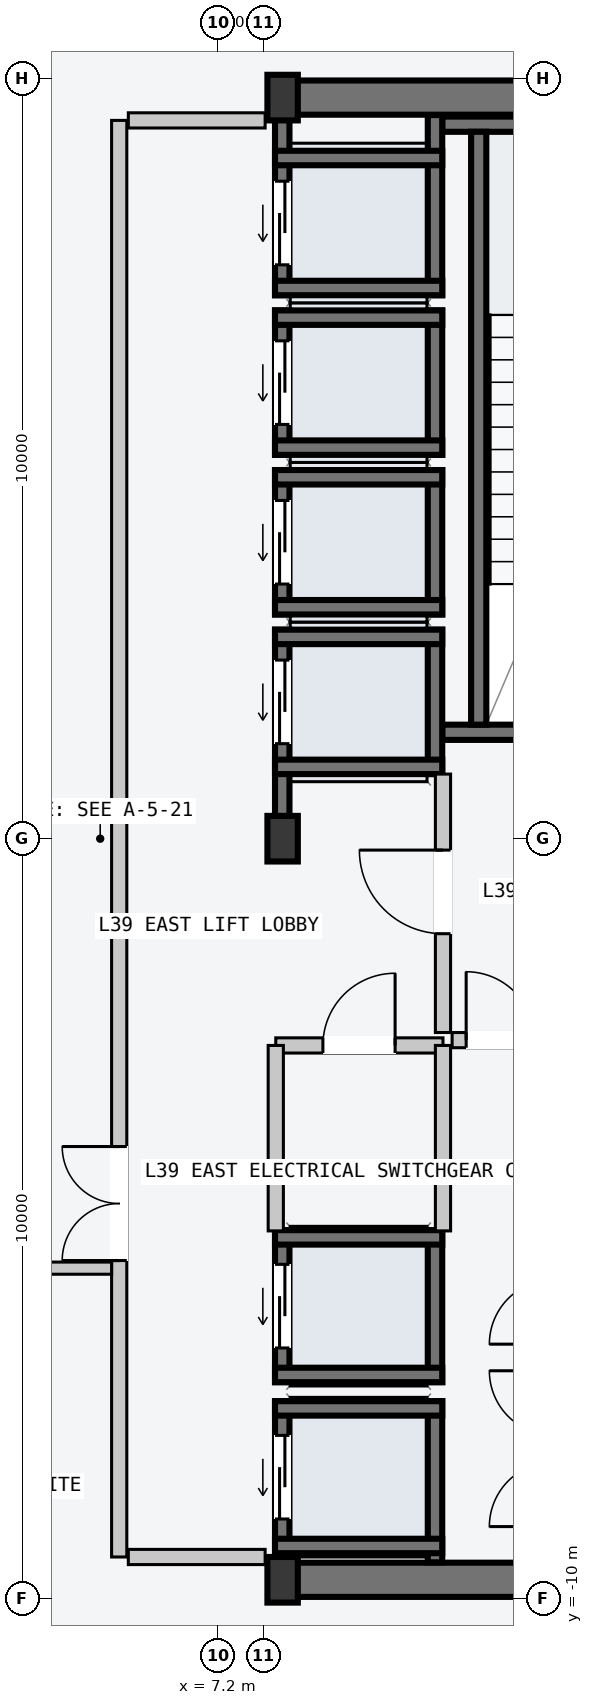
"""IFC4 building model, lengths in metres.
Left out: names, types, materials, properties, quantities, classifications, styles, units other than length and angle.
Written with IfcOpenShell. Run it as: python <this file> out.ifc"""

import sys

from ifc_helpers import new_model, si_unit, direction, frame, frame_2d, origin, origin_2d, place, context, subcontext, project, spatial, rectangle, i_section, extrude, element, fill, save


model = new_model("IFC4")
c1 = context("Model", 3, precision=1e-05, world=origin(), true_north=direction((0.0, 1.0)))
c2 = subcontext(c1, "Body", "Model", "MODEL_VIEW")
j1 = project(units=[si_unit("LENGTHUNIT", "METRE"), si_unit("PLANEANGLEUNIT", "RADIAN")], contexts=[c1])
p1 = place(None, origin())
s1 = spatial("IfcSite", under=j1, at=p1, CompositionType="ELEMENT")
p2 = place(p1, origin())
s2 = spatial("IfcBuilding", under=s1, at=p2, CompositionType="ELEMENT")
p3 = place(p2, frame((0.0, 0.0, 150.6)))
s3 = spatial("IfcBuildingStorey", under=s2, at=p3, CompositionType="ELEMENT", Elevation=150.6)
for number, where, z_axis, x_axis in (
    (1, (8.07, -9.75, -0.2), (0.0, 0.0, 1.0), (1.0, 0.0, 0.0)),
    (2, (8.07, 9.75, -0.2), (0.0, 0.0, 1.0), (1.0, 0.0, 0.0)),
):
    element("IfcWall", number, at=place(p3, frame(where, z_axis=z_axis, x_axis=x_axis)), inside=s3, PredefinedType="SHEAR", context=c2, shape_type="SweptSolid", body=[
        extrude(rectangle(XDim=6.46, YDim=0.45, at=frame_2d((3.23, 0.0))), origin(), (0.0, 0.0, 1.0), 4.5),
    ])
p4 = place(p3, frame((10.15, 1.4, -0.2), z_axis=(0.0, 0.0, 1.0), x_axis=(1.0, 0.0, 0.0)))
e3 = element("IfcWall", 3, at=p4, inside=s3, PredefinedType="SOLIDWALL", context=c2, shape_type="SweptSolid", body=[
    extrude(rectangle(XDim=4.1, YDim=0.2, at=frame_2d((2.05, 0.0))), origin(), (0.0, 0.0, 1.0), 4.5),
])
p5 = place(p4, frame((1.5, 0.0, 0.2)))
e4 = element("IfcOpeningElement", 4, at=p5, cuts=e3, PredefinedType="OPENING", context=c2, shape_type="SweptSolid", body=[
    extrude(rectangle(XDim=1.12, YDim=2.18, at=frame_2d((0.56, 1.09))), frame((0.0, 0.11, 0.0), z_axis=(0.0, -1.0, 0.0), x_axis=(1.0, 0.0, 0.0)), (0.0, 0.0, 1.0), 0.22),
])
p6 = place(p3, frame((10.15, 9.4, -0.2), z_axis=(0.0, 0.0, 1.0), x_axis=(1.0, 0.0, 0.0)))
e5 = element("IfcWall", 5, at=p6, inside=s3, PredefinedType="SOLIDWALL", context=c2, shape_type="SweptSolid", body=[
    extrude(rectangle(XDim=4.1, YDim=0.2, at=frame_2d((2.05, 0.0))), origin(), (0.0, 0.0, 1.0), 4.5),
])
p7 = place(p3, frame((10.63, 1.5, -0.2), z_axis=(0.0, 0.0, 1.0), x_axis=(0.0, 1.0, 0.0)))
e6 = element("IfcWall", 6, at=p7, inside=s3, PredefinedType="SOLIDWALL", context=c2, shape_type="SweptSolid", body=[
    extrude(rectangle(XDim=7.8, YDim=0.2, at=frame_2d((3.9, 0.0))), origin(), (0.0, 0.0, 1.0), 4.5),
])
for number, where, z_axis, x_axis in (
    (7, (8.05, -9.75, 0.0), (0.0, 0.0, 1.0), (1.0, 0.0, 0.0)),
    (8, (8.05, 0.0, 0.0), (0.0, 0.0, 1.0), (1.0, 0.0, 0.0)),
    (9, (8.05, 9.75, 0.0), (0.0, 0.0, 1.0), (1.0, 0.0, 0.0)),
):
    element("IfcColumn", number, at=place(p3, frame(where, z_axis=z_axis, x_axis=x_axis)), inside=s3, PredefinedType="COLUMN", context=c2, shape_type="SweptSolid", body=[
        extrude(i_section(OverallWidth=0.4, OverallDepth=0.6, WebThickness=0.022, FlangeThickness=0.036, at=origin_2d()), origin(), (0.0, 0.0, 1.0), 4.5),
    ])
p8 = place(p3, frame((8.045, 0.21, -0.2), z_axis=(0.0, 0.0, 1.0), x_axis=(0.0, 1.0, 0.0)))
e10 = element("IfcWall", 10, at=p8, inside=s3, PredefinedType="SOLIDWALL", context=c2, shape_type="SweptSolid", body=[
    extrude(rectangle(XDim=2.54, YDim=0.19, at=frame_2d((1.27, 0.0))), origin(), (0.0, 0.0, 1.0), 4.5),
])
p9 = place(p8, frame((1.04, 0.0, 0.2)))
e11 = element("IfcOpeningElement", 11, at=p9, cuts=e10, PredefinedType="OPENING", context=c2, shape_type="SweptSolid", body=[
    extrude(rectangle(XDim=1.1, YDim=2.2, at=frame_2d((0.55, 1.1))), frame((0.0, 0.105, 0.0), z_axis=(0.0, -1.0, 0.0), x_axis=(1.0, 0.0, 0.0)), (0.0, 0.0, 1.0), 0.21),
])
p10 = place(p3, frame((10.055, 0.85, -0.2), z_axis=(0.0, 0.0, 1.0), x_axis=(0.0, 1.0, 0.0)))
e12 = element("IfcWall", 12, at=p10, inside=s3, PredefinedType="SOLIDWALL", context=c2, shape_type="SweptSolid", body=[
    extrude(rectangle(XDim=1.9, YDim=0.19, at=frame_2d((0.95, 0.0))), origin(), (0.0, 0.0, 1.0), 4.5),
])
for number, where, z_axis, x_axis in (
    (13, (7.95, 2.655, -0.2), (0.0, 0.0, 1.0), (1.0, 0.0, 0.0)),
    (14, (7.95, 0.945, -0.2), (0.0, 0.0, 1.0), (1.0, 0.0, 0.0)),
):
    element("IfcWall", number, at=place(p3, frame(where, z_axis=z_axis, x_axis=x_axis)), inside=s3, PredefinedType="SOLIDWALL", context=c2, shape_type="SweptSolid", body=[
        extrude(rectangle(XDim=2.2, YDim=0.19, at=frame_2d((1.1, 0.0))), origin(), (0.0, 0.0, 1.0), 4.5),
    ])
p11 = place(p3, frame((8.045, 2.95, -0.2), z_axis=(0.0, 0.0, 1.0), x_axis=(0.0, 1.0, 0.0)))
e15 = element("IfcWall", 15, at=p11, inside=s3, PredefinedType="SOLIDWALL", context=c2, shape_type="SweptSolid", body=[
    extrude(rectangle(XDim=1.9, YDim=0.19, at=frame_2d((0.95, 0.0))), origin(), (0.0, 0.0, 1.0), 4.5),
])
p12 = place(p11, frame((0.4, 0.0, 0.2)))
e16 = element("IfcOpeningElement", 16, at=p12, cuts=e15, PredefinedType="OPENING", context=c2, shape_type="SweptSolid", body=[
    extrude(rectangle(XDim=1.1, YDim=2.2, at=frame_2d((0.55, 1.1))), frame((0.0, 0.105, 0.0), z_axis=(0.0, -1.0, 0.0), x_axis=(1.0, 0.0, 0.0)), (0.0, 0.0, 1.0), 0.21),
])
p13 = place(p3, frame((10.055, 2.95, -0.2), z_axis=(0.0, 0.0, 1.0), x_axis=(0.0, 1.0, 0.0)))
e17 = element("IfcWall", 17, at=p13, inside=s3, PredefinedType="SOLIDWALL", context=c2, shape_type="SweptSolid", body=[
    extrude(rectangle(XDim=1.9, YDim=0.19, at=frame_2d((0.95, 0.0))), origin(), (0.0, 0.0, 1.0), 4.5),
])
for number, where, z_axis, x_axis in (
    (18, (7.95, 4.755, -0.2), (0.0, 0.0, 1.0), (1.0, 0.0, 0.0)),
    (19, (7.95, 3.045, -0.2), (0.0, 0.0, 1.0), (1.0, 0.0, 0.0)),
):
    element("IfcWall", number, at=place(p3, frame(where, z_axis=z_axis, x_axis=x_axis)), inside=s3, PredefinedType="SOLIDWALL", context=c2, shape_type="SweptSolid", body=[
        extrude(rectangle(XDim=2.2, YDim=0.19, at=frame_2d((1.1, 0.0))), origin(), (0.0, 0.0, 1.0), 4.5),
    ])
p14 = place(p3, frame((8.045, 5.05, -0.2), z_axis=(0.0, 0.0, 1.0), x_axis=(0.0, 1.0, 0.0)))
e20 = element("IfcWall", 20, at=p14, inside=s3, PredefinedType="SOLIDWALL", context=c2, shape_type="SweptSolid", body=[
    extrude(rectangle(XDim=1.9, YDim=0.19, at=frame_2d((0.95, 0.0))), origin(), (0.0, 0.0, 1.0), 4.5),
])
p15 = place(p14, frame((0.4, 0.0, 0.2)))
e21 = element("IfcOpeningElement", 21, at=p15, cuts=e20, PredefinedType="OPENING", context=c2, shape_type="SweptSolid", body=[
    extrude(rectangle(XDim=1.1, YDim=2.2, at=frame_2d((0.55, 1.1))), frame((0.0, 0.105, 0.0), z_axis=(0.0, -1.0, 0.0), x_axis=(1.0, 0.0, 0.0)), (0.0, 0.0, 1.0), 0.21),
])
p16 = place(p3, frame((10.055, 5.05, -0.2), z_axis=(0.0, 0.0, 1.0), x_axis=(0.0, 1.0, 0.0)))
e22 = element("IfcWall", 22, at=p16, inside=s3, PredefinedType="SOLIDWALL", context=c2, shape_type="SweptSolid", body=[
    extrude(rectangle(XDim=1.9, YDim=0.19, at=frame_2d((0.95, 0.0))), origin(), (0.0, 0.0, 1.0), 4.5),
])
for number, where, z_axis, x_axis in (
    (23, (7.95, 6.855, -0.2), (0.0, 0.0, 1.0), (1.0, 0.0, 0.0)),
    (24, (7.95, 5.145, -0.2), (0.0, 0.0, 1.0), (1.0, 0.0, 0.0)),
):
    element("IfcWall", number, at=place(p3, frame(where, z_axis=z_axis, x_axis=x_axis)), inside=s3, PredefinedType="SOLIDWALL", context=c2, shape_type="SweptSolid", body=[
        extrude(rectangle(XDim=2.2, YDim=0.19, at=frame_2d((1.1, 0.0))), origin(), (0.0, 0.0, 1.0), 4.5),
    ])
p17 = place(p3, frame((8.045, 7.15, -0.2), z_axis=(0.0, 0.0, 1.0), x_axis=(0.0, 1.0, 0.0)))
e25 = element("IfcWall", 25, at=p17, inside=s3, PredefinedType="SOLIDWALL", context=c2, shape_type="SweptSolid", body=[
    extrude(rectangle(XDim=2.37, YDim=0.19, at=frame_2d((1.185, 0.0))), origin(), (0.0, 0.0, 1.0), 4.5),
])
p18 = place(p17, frame((0.4, 0.0, 0.2)))
e26 = element("IfcOpeningElement", 26, at=p18, cuts=e25, PredefinedType="OPENING", context=c2, shape_type="SweptSolid", body=[
    extrude(rectangle(XDim=1.1, YDim=2.2, at=frame_2d((0.55, 1.1))), frame((0.0, 0.105, 0.0), z_axis=(0.0, -1.0, 0.0), x_axis=(1.0, 0.0, 0.0)), (0.0, 0.0, 1.0), 0.21),
])
p19 = place(p3, frame((10.055, 7.15, -0.2), z_axis=(0.0, 0.0, 1.0), x_axis=(0.0, 1.0, 0.0)))
e27 = element("IfcWall", 27, at=p19, inside=s3, PredefinedType="SOLIDWALL", context=c2, shape_type="SweptSolid", body=[
    extrude(rectangle(XDim=2.37, YDim=0.19, at=frame_2d((1.185, 0.0))), origin(), (0.0, 0.0, 1.0), 4.5),
])
for number, where, z_axis, x_axis in (
    (28, (7.95, 8.955, -0.2), (0.0, 0.0, 1.0), (1.0, 0.0, 0.0)),
    (29, (7.95, 7.245, -0.2), (0.0, 0.0, 1.0), (1.0, 0.0, 0.0)),
):
    element("IfcWall", number, at=place(p3, frame(where, z_axis=z_axis, x_axis=x_axis)), inside=s3, PredefinedType="SOLIDWALL", context=c2, shape_type="SweptSolid", body=[
        extrude(rectangle(XDim=2.2, YDim=0.19, at=frame_2d((1.1, 0.0))), origin(), (0.0, 0.0, 1.0), 4.5),
    ])
p20 = place(p3, frame((8.045, -9.52, -0.2), z_axis=(0.0, 0.0, 1.0), x_axis=(0.0, 1.0, 0.0)))
e30 = element("IfcWall", 30, at=p20, inside=s3, PredefinedType="SOLIDWALL", context=c2, shape_type="SweptSolid", body=[
    extrude(rectangle(XDim=2.12, YDim=0.19, at=frame_2d((1.06, 0.0))), origin(), (0.0, 0.0, 1.0), 4.5),
])
p21 = place(p20, frame((0.57, 0.0, 0.2)))
e31 = element("IfcOpeningElement", 31, at=p21, cuts=e30, PredefinedType="OPENING", context=c2, shape_type="SweptSolid", body=[
    extrude(rectangle(XDim=1.1, YDim=2.2, at=frame_2d((0.55, 1.1))), frame((0.0, 0.105, 0.0), z_axis=(0.0, -1.0, 0.0), x_axis=(1.0, 0.0, 0.0)), (0.0, 0.0, 1.0), 0.21),
])
p22 = place(p3, frame((10.055, -9.52, -0.2), z_axis=(0.0, 0.0, 1.0), x_axis=(0.0, 1.0, 0.0)))
e32 = element("IfcWall", 32, at=p22, inside=s3, PredefinedType="SOLIDWALL", context=c2, shape_type="SweptSolid", body=[
    extrude(rectangle(XDim=2.12, YDim=0.19, at=frame_2d((1.06, 0.0))), origin(), (0.0, 0.0, 1.0), 4.5),
])
for number, where, z_axis, x_axis in (
    (33, (7.95, -7.495, -0.2), (0.0, 0.0, 1.0), (1.0, 0.0, 0.0)),
    (34, (7.95, -9.305, -0.2), (0.0, 0.0, 1.0), (1.0, 0.0, 0.0)),
):
    element("IfcWall", number, at=place(p3, frame(where, z_axis=z_axis, x_axis=x_axis)), inside=s3, PredefinedType="SOLIDWALL", context=c2, shape_type="SweptSolid", body=[
        extrude(rectangle(XDim=2.2, YDim=0.19, at=frame_2d((1.1, 0.0))), origin(), (0.0, 0.0, 1.0), 4.5),
    ])
p23 = place(p3, frame((8.045, -7.15, -0.2), z_axis=(0.0, 0.0, 1.0), x_axis=(0.0, 1.0, 0.0)))
e35 = element("IfcWall", 35, at=p23, inside=s3, PredefinedType="SOLIDWALL", context=c2, shape_type="SweptSolid", body=[
    extrude(rectangle(XDim=2.0, YDim=0.19, at=frame_2d((1.0, 0.0))), origin(), (0.0, 0.0, 1.0), 4.5),
])
p24 = place(p23, frame((0.45, 0.0, 0.2)))
e36 = element("IfcOpeningElement", 36, at=p24, cuts=e35, PredefinedType="OPENING", context=c2, shape_type="SweptSolid", body=[
    extrude(rectangle(XDim=1.1, YDim=2.2, at=frame_2d((0.55, 1.1))), frame((0.0, 0.105, 0.0), z_axis=(0.0, -1.0, 0.0), x_axis=(1.0, 0.0, 0.0)), (0.0, 0.0, 1.0), 0.21),
])
p25 = place(p3, frame((10.055, -7.15, -0.2), z_axis=(0.0, 0.0, 1.0), x_axis=(0.0, 1.0, 0.0)))
e37 = element("IfcWall", 37, at=p25, inside=s3, PredefinedType="SOLIDWALL", context=c2, shape_type="SweptSolid", body=[
    extrude(rectangle(XDim=2.0, YDim=0.19, at=frame_2d((1.0, 0.0))), origin(), (0.0, 0.0, 1.0), 4.5),
])
for number, where, z_axis, x_axis in (
    (38, (7.95, -5.245, -0.2), (0.0, 0.0, 1.0), (1.0, 0.0, 0.0)),
    (39, (7.95, -7.055, -0.2), (0.0, 0.0, 1.0), (1.0, 0.0, 0.0)),
):
    element("IfcWall", number, at=place(p3, frame(where, z_axis=z_axis, x_axis=x_axis)), inside=s3, PredefinedType="SOLIDWALL", context=c2, shape_type="SweptSolid", body=[
        extrude(rectangle(XDim=2.2, YDim=0.19, at=frame_2d((1.1, 0.0))), origin(), (0.0, 0.0, 1.0), 4.5),
    ])
p26 = place(p3, frame((5.9, -9.45, 0.0), z_axis=(0.0, 0.0, 1.0), x_axis=(0.0, 1.0, 0.0)))
e40 = element("IfcWall", 40, at=p26, inside=s3, PredefinedType="PARTITIONING", context=c2, shape_type="SweptSolid", body=[
    extrude(rectangle(XDim=18.9, YDim=0.2, at=frame_2d((9.45, 0.0))), origin(), (0.0, 0.0, 1.0), 4.3),
])
p27 = place(p26, frame((3.9, 0.0, 0.0)))
e41 = element("IfcOpeningElement", 41, at=p27, cuts=e40, PredefinedType="OPENING", context=c2, shape_type="SweptSolid", body=[
    extrude(rectangle(XDim=1.5, YDim=2.2, at=frame_2d((0.75, 1.1))), frame((0.0, 0.11, 0.0), z_axis=(0.0, -1.0, 0.0), x_axis=(1.0, 0.0, 0.0)), (0.0, 0.0, 1.0), 0.22),
])
for number, where, z_axis, x_axis in (
    (42, (6.02, -9.45, 0.0), (0.0, 0.0, 1.0), (1.0, 0.0, 0.0)),
    (43, (6.02, 9.45, 0.0), (0.0, 0.0, 1.0), (1.0, 0.0, 0.0)),
):
    element("IfcWall", number, at=place(p3, frame(where, z_axis=z_axis, x_axis=x_axis)), inside=s3, PredefinedType="PARTITIONING", context=c2, shape_type="SweptSolid", body=[
        extrude(rectangle(XDim=1.8, YDim=0.2, at=frame_2d((0.9, 0.0))), origin(), (0.0, 0.0, 1.0), 4.3),
    ])
p28 = place(p3, frame((10.16, -2.55, 0.0), z_axis=(0.0, 0.0, 1.0), x_axis=(0.0, 1.0, 0.0)))
e44 = element("IfcWall", 44, at=p28, inside=s3, PredefinedType="PARTITIONING", context=c2, shape_type="SweptSolid", body=[
    extrude(rectangle(XDim=3.4, YDim=0.2, at=frame_2d((1.7, 0.0))), origin(), (0.0, 0.0, 1.0), 4.3),
])
p29 = place(p28, frame((1.3, 0.0, 0.0)))
e45 = element("IfcOpeningElement", 45, at=p29, cuts=e44, PredefinedType="OPENING", context=c2, shape_type="SweptSolid", body=[
    extrude(rectangle(XDim=1.1, YDim=2.15, at=frame_2d((0.55, 1.075))), frame((0.0, 0.11, 0.0), z_axis=(0.0, -1.0, 0.0), x_axis=(1.0, 0.0, 0.0)), (0.0, 0.0, 1.0), 0.22),
])
p30 = place(p3, frame((10.28, -2.65, 0.0), z_axis=(0.0, 0.0, 1.0), x_axis=(1.0, 0.0, 0.0)))
e46 = element("IfcWall", 46, at=p30, inside=s3, PredefinedType="PARTITIONING", context=c2, shape_type="SweptSolid", body=[
    extrude(rectangle(XDim=1.27, YDim=0.2, at=frame_2d((0.635, 0.0))), origin(), (0.0, 0.0, 1.0), 4.3),
])
p31 = place(p30, frame((0.185, 0.0, 0.0)))
e47 = element("IfcOpeningElement", 47, at=p31, cuts=e46, PredefinedType="OPENING", context=c2, shape_type="SweptSolid", body=[
    extrude(rectangle(XDim=0.9, YDim=2.15, at=frame_2d((0.45, 1.075))), frame((0.0, 0.11, 0.0), z_axis=(0.0, -1.0, 0.0), x_axis=(1.0, 0.0, 0.0)), (0.0, 0.0, 1.0), 0.22),
])
p32 = place(p3, frame((7.96, -2.72, 0.0), z_axis=(0.0, 0.0, 1.0), x_axis=(1.0, 0.0, 0.0)))
e48 = element("IfcWall", 48, at=p32, inside=s3, PredefinedType="PARTITIONING", context=c2, shape_type="SweptSolid", body=[
    extrude(rectangle(XDim=2.2, YDim=0.2, at=frame_2d((1.1, 0.0))), origin(), (0.0, 0.0, 1.0), 4.3),
])
p33 = place(p32, frame((0.62, 0.0, 0.0)))
e49 = element("IfcOpeningElement", 49, at=p33, cuts=e48, PredefinedType="OPENING", context=c2, shape_type="SweptSolid", body=[
    extrude(rectangle(XDim=0.95, YDim=2.1, at=frame_2d((0.475, 1.05))), frame((0.0, 0.11, 0.0), z_axis=(0.0, -1.0, 0.0), x_axis=(1.0, 0.0, 0.0)), (0.0, 0.0, 1.0), 0.22),
])
for number, where, z_axis, x_axis in (
    (50, (7.96, -5.16, 0.0), (0.0, 0.0, 1.0), (0.0, 1.0, 0.0)),
    (51, (10.16, -5.16, 0.0), (0.0, 0.0, 1.0), (0.0, 1.0, 0.0)),
):
    element("IfcWall", number, at=place(p3, frame(where, z_axis=z_axis, x_axis=x_axis)), inside=s3, PredefinedType="PARTITIONING", context=c2, shape_type="SweptSolid", body=[
        extrude(rectangle(XDim=2.44, YDim=0.2, at=frame_2d((1.22, 0.0))), origin(), (0.0, 0.0, 1.0), 4.3),
    ])
p34 = place(p3, frame((-5.8, -5.65, 0.0), z_axis=(0.0, 0.0, 1.0), x_axis=(1.0, 0.0, 0.0)))
e52 = element("IfcWall", 52, at=p34, inside=s3, PredefinedType="PARTITIONING", context=c2, shape_type="SweptSolid", body=[
    extrude(rectangle(XDim=11.6, YDim=0.16, at=frame_2d((5.8, 0.0))), origin(), (0.0, 0.0, 1.0), 4.3),
])
p35 = place(p34, frame((5.1, 0.0, 0.0)))
e53 = element("IfcOpeningElement", 53, at=p35, cuts=e52, PredefinedType="OPENING", context=c2, shape_type="SweptSolid", body=[
    extrude(rectangle(XDim=1.4, YDim=2.2, at=frame_2d((0.7, 1.1))), frame((0.0, 0.09, 0.0), z_axis=(0.0, -1.0, 0.0), x_axis=(1.0, 0.0, 0.0)), (0.0, 0.0, 1.0), 0.18),
])
p36 = place(p9, origin())
e54 = element("IfcDoor", 54, at=p36, inside=s3, OperationType="SLIDING_TO_LEFT", PredefinedType="DOOR", context=c2, shape_type="SweptSolid", body=[
    extrude(rectangle(XDim=1.1, YDim=2.2, at=frame_2d((0.55, 1.1))), frame((0.0, 0.025, 0.0), z_axis=(0.0, -1.0, 0.0), x_axis=(1.0, 0.0, 0.0)), (0.0, 0.0, 1.0), 0.05),
])
fill(e11, e54)
p37 = place(p12, origin())
e55 = element("IfcDoor", 55, at=p37, inside=s3, OperationType="SLIDING_TO_LEFT", PredefinedType="DOOR", context=c2, shape_type="SweptSolid", body=[
    extrude(rectangle(XDim=1.1, YDim=2.2, at=frame_2d((0.55, 1.1))), frame((0.0, 0.025, 0.0), z_axis=(0.0, -1.0, 0.0), x_axis=(1.0, 0.0, 0.0)), (0.0, 0.0, 1.0), 0.05),
])
fill(e16, e55)
p38 = place(p15, origin())
e56 = element("IfcDoor", 56, at=p38, inside=s3, OperationType="SLIDING_TO_LEFT", PredefinedType="DOOR", context=c2, shape_type="SweptSolid", body=[
    extrude(rectangle(XDim=1.1, YDim=2.2, at=frame_2d((0.55, 1.1))), frame((0.0, 0.025, 0.0), z_axis=(0.0, -1.0, 0.0), x_axis=(1.0, 0.0, 0.0)), (0.0, 0.0, 1.0), 0.05),
])
fill(e21, e56)
p39 = place(p18, origin())
e57 = element("IfcDoor", 57, at=p39, inside=s3, OperationType="SLIDING_TO_LEFT", PredefinedType="DOOR", context=c2, shape_type="SweptSolid", body=[
    extrude(rectangle(XDim=1.1, YDim=2.2, at=frame_2d((0.55, 1.1))), frame((0.0, 0.025, 0.0), z_axis=(0.0, -1.0, 0.0), x_axis=(1.0, 0.0, 0.0)), (0.0, 0.0, 1.0), 0.05),
])
fill(e26, e57)
p40 = place(p21, origin())
e58 = element("IfcDoor", 58, at=p40, inside=s3, OperationType="SLIDING_TO_LEFT", PredefinedType="DOOR", context=c2, shape_type="SweptSolid", body=[
    extrude(rectangle(XDim=1.1, YDim=2.2, at=frame_2d((0.55, 1.1))), frame((0.0, 0.025, 0.0), z_axis=(0.0, -1.0, 0.0), x_axis=(1.0, 0.0, 0.0)), (0.0, 0.0, 1.0), 0.05),
])
fill(e31, e58)
p41 = place(p24, origin())
e59 = element("IfcDoor", 59, at=p41, inside=s3, OperationType="SLIDING_TO_LEFT", PredefinedType="DOOR", context=c2, shape_type="SweptSolid", body=[
    extrude(rectangle(XDim=1.1, YDim=2.2, at=frame_2d((0.55, 1.1))), frame((0.0, 0.025, 0.0), z_axis=(0.0, -1.0, 0.0), x_axis=(1.0, 0.0, 0.0)), (0.0, 0.0, 1.0), 0.05),
])
fill(e36, e59)
p42 = place(p27, origin())
e60 = element("IfcDoor", 60, at=p42, inside=s3, OperationType="DOUBLE_DOOR_SINGLE_SWING", PredefinedType="DOOR", context=c2, shape_type="SweptSolid", body=[
    extrude(rectangle(XDim=1.5, YDim=2.2, at=frame_2d((0.75, 1.1))), frame((0.0, 0.025, 0.0), z_axis=(0.0, -1.0, 0.0), x_axis=(1.0, 0.0, 0.0)), (0.0, 0.0, 1.0), 0.05),
])
fill(e41, e60)
p43 = place(p29, origin())
e61 = element("IfcDoor", 61, at=p43, inside=s3, OperationType="SINGLE_SWING_RIGHT", PredefinedType="DOOR", context=c2, shape_type="SweptSolid", body=[
    extrude(rectangle(XDim=1.1, YDim=2.15, at=frame_2d((0.55, 1.075))), frame((0.0, 0.025, 0.0), z_axis=(0.0, -1.0, 0.0), x_axis=(1.0, 0.0, 0.0)), (0.0, 0.0, 1.0), 0.05),
])
fill(e45, e61)
p44 = place(p31, origin())
e62 = element("IfcDoor", 62, at=p44, inside=s3, OperationType="SINGLE_SWING_LEFT", PredefinedType="DOOR", context=c2, shape_type="SweptSolid", body=[
    extrude(rectangle(XDim=0.9, YDim=2.15, at=frame_2d((0.45, 1.075))), frame((0.0, 0.025, 0.0), z_axis=(0.0, -1.0, 0.0), x_axis=(1.0, 0.0, 0.0)), (0.0, 0.0, 1.0), 0.05),
])
fill(e47, e62)
p45 = place(p33, origin())
e63 = element("IfcDoor", 63, at=p45, inside=s3, OperationType="SINGLE_SWING_RIGHT", PredefinedType="DOOR", context=c2, shape_type="SweptSolid", body=[
    extrude(rectangle(XDim=0.95, YDim=2.1, at=frame_2d((0.475, 1.05))), frame((0.0, 0.025, 0.0), z_axis=(0.0, -1.0, 0.0), x_axis=(1.0, 0.0, 0.0)), (0.0, 0.0, 1.0), 0.05),
])
fill(e49, e63)
save(model, sys.argv[1])
